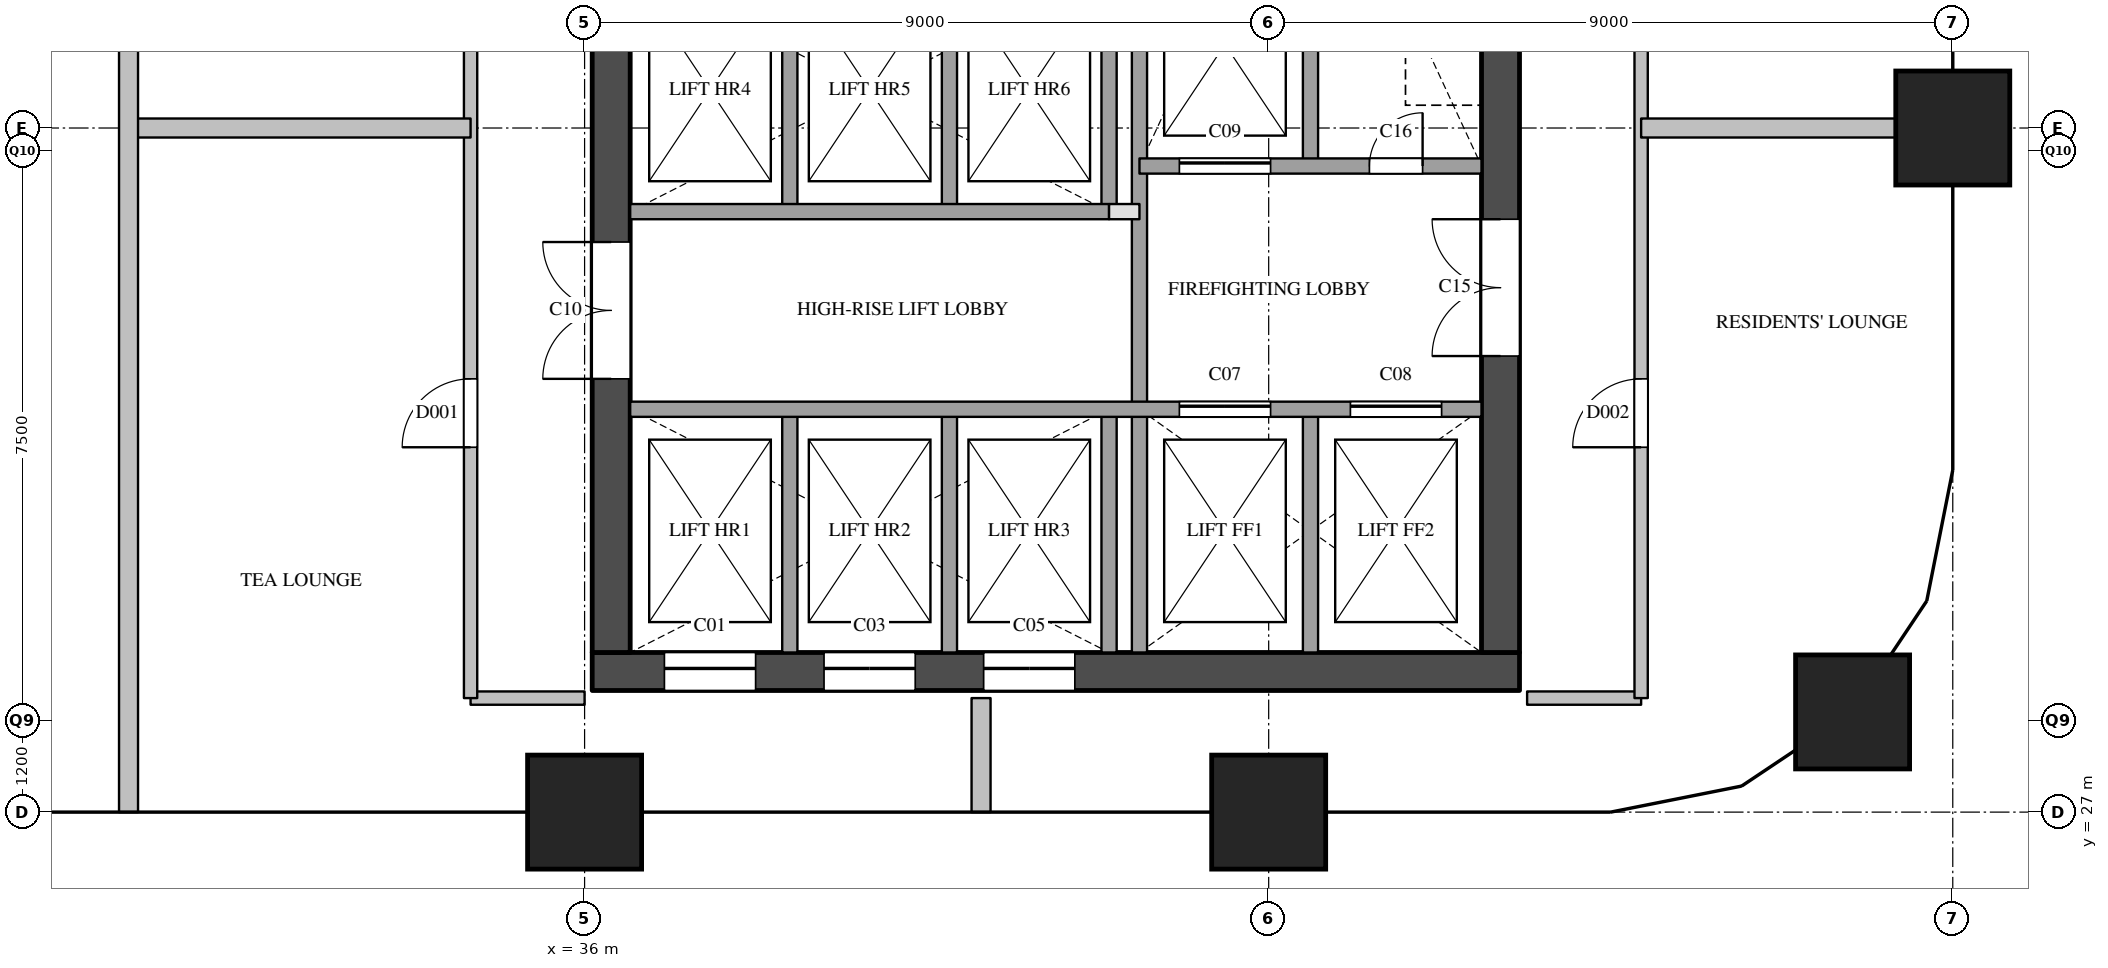
"""IFC4 building model, lengths in metres.
Left out: names, types, materials, properties, quantities, classifications, styles, units other than length and angle.
Written with IfcOpenShell. Run it as: python <this file> out.ifc"""

import sys

from ifc_helpers import new_model, si_unit, direction, frame, frame_2d, origin, origin_2d, place, context, subcontext, project, spatial, rectangle, extrude, element, fill, save


model = new_model("IFC4")
c1 = context("Model", 3, precision=1e-05, world=origin(), true_north=direction((0.0, 1.0)))
c2 = subcontext(c1, "Body", "Model", "MODEL_VIEW")
j1 = project(units=[si_unit("LENGTHUNIT", "METRE"), si_unit("PLANEANGLEUNIT", "RADIAN")], contexts=[c1])
p1 = place(None, origin())
s1 = spatial("IfcSite", under=j1, at=p1, CompositionType="ELEMENT")
p2 = place(p1, origin())
s2 = spatial("IfcBuilding", under=s1, at=p2, CompositionType="ELEMENT")
p3 = place(p2, frame((0.0, 0.0, 158.3)))
s3 = spatial("IfcBuildingStorey", under=s2, at=p3, CompositionType="ELEMENT", Elevation=158.3)
for number, where, z_axis, x_axis in (
    (1, (36.0, 27.0, 0.0), (0.0, 0.0, 1.0), (1.0, 0.0, 0.0)),
    (2, (45.0, 27.0, 0.0), (0.0, 0.0, 1.0), (1.0, 0.0, 0.0)),
    (3, (52.682, 28.318, 0.0), (0.0, 0.0, 1.0), (1.0, 0.0, 0.0)),
    (4, (54.0, 36.0, 0.0), (0.0, 0.0, 1.0), (1.0, 0.0, 0.0)),
):
    element("IfcColumn", number, at=place(p3, frame(where, z_axis=z_axis, x_axis=x_axis)), inside=s3, PredefinedType="COLUMN", context=c2, shape_type="SweptSolid", body=[
        extrude(rectangle(XDim=1.5, YDim=1.5, at=origin_2d()), origin(), (0.0, 0.0, 1.0), 3.9),
    ])
p4 = place(p3, frame((36.1, 28.85, 0.0), z_axis=(0.0, 0.0, 1.0), x_axis=(1.0, 0.0, 0.0)))
e5 = element("IfcWall", 5, at=p4, inside=s3, PredefinedType="SHEAR", context=c2, shape_type="SweptSolid", body=[
    extrude(rectangle(XDim=12.2, YDim=0.5, at=frame_2d((6.1, 0.0))), origin(), (0.0, 0.0, 1.0), 3.6),
])
p5 = place(p4, frame((0.95, 0.0, 0.0)))
e6 = element("IfcOpeningElement", 6, at=p5, cuts=e5, PredefinedType="OPENING", context=c2, shape_type="SweptSolid", body=[
    extrude(rectangle(XDim=1.2, YDim=2.1, at=frame_2d((0.6, 1.05))), frame((0.0, 0.26, 0.0), z_axis=(0.0, -1.0, 0.0), x_axis=(1.0, 0.0, 0.0)), (0.0, 0.0, 1.0), 0.52),
])
p6 = place(p4, frame((3.05, 0.0, 0.0)))
e7 = element("IfcOpeningElement", 7, at=p6, cuts=e5, PredefinedType="OPENING", context=c2, shape_type="SweptSolid", body=[
    extrude(rectangle(XDim=1.2, YDim=2.1, at=frame_2d((0.6, 1.05))), frame((0.0, 0.26, 0.0), z_axis=(0.0, -1.0, 0.0), x_axis=(1.0, 0.0, 0.0)), (0.0, 0.0, 1.0), 0.52),
])
p7 = place(p4, frame((5.15, 0.0, 0.0)))
e8 = element("IfcOpeningElement", 8, at=p7, cuts=e5, PredefinedType="OPENING", context=c2, shape_type="SweptSolid", body=[
    extrude(rectangle(XDim=1.2, YDim=2.1, at=frame_2d((0.6, 1.05))), frame((0.0, 0.26, 0.0), z_axis=(0.0, -1.0, 0.0), x_axis=(1.0, 0.0, 0.0)), (0.0, 0.0, 1.0), 0.52),
])
p8 = place(p3, frame((36.35, 29.1, 0.0), z_axis=(0.0, 0.0, 1.0), x_axis=(0.0, 1.0, 0.0)))
e9 = element("IfcWall", 9, at=p8, inside=s3, PredefinedType="SHEAR", context=c2, shape_type="SweptSolid", body=[
    extrude(rectangle(XDim=20.3, YDim=0.5, at=frame_2d((10.15, 0.0))), origin(), (0.0, 0.0, 1.0), 3.6),
])
p9 = place(p8, frame((3.6, 0.0, 0.0)))
e10 = element("IfcOpeningElement", 10, at=p9, cuts=e9, PredefinedType="OPENING", context=c2, shape_type="SweptSolid", body=[
    extrude(rectangle(XDim=1.8, YDim=2.1, at=frame_2d((0.9, 1.05))), frame((0.0, 0.26, 0.0), z_axis=(0.0, -1.0, 0.0), x_axis=(1.0, 0.0, 0.0)), (0.0, 0.0, 1.0), 0.52),
])
p10 = place(p8, frame((16.4, 0.0, 0.0)))
e11 = element("IfcOpeningElement", 11, at=p10, cuts=e9, PredefinedType="OPENING", context=c2, shape_type="SweptSolid", body=[
    extrude(rectangle(XDim=1.0, YDim=2.1, at=frame_2d((0.5, 1.05))), frame((0.0, 0.26, 0.0), z_axis=(0.0, -1.0, 0.0), x_axis=(1.0, 0.0, 0.0)), (0.0, 0.0, 1.0), 0.52),
])
p11 = place(p3, frame((48.05, 29.1, 0.0), z_axis=(0.0, 0.0, 1.0), x_axis=(0.0, 1.0, 0.0)))
e12 = element("IfcWall", 12, at=p11, inside=s3, PredefinedType="SHEAR", context=c2, shape_type="SweptSolid", body=[
    extrude(rectangle(XDim=20.3, YDim=0.5, at=frame_2d((10.15, 0.0))), origin(), (0.0, 0.0, 1.0), 3.6),
])
p12 = place(p11, frame((12.5, 0.0, 0.0)))
e13 = element("IfcOpeningElement", 13, at=p12, cuts=e12, PredefinedType="OPENING", context=c2, shape_type="SweptSolid", body=[
    extrude(rectangle(XDim=0.7, YDim=2.1, at=frame_2d((0.35, 1.05))), frame((0.0, 0.26, 0.0), z_axis=(0.0, -1.0, 0.0), x_axis=(1.0, 0.0, 0.0)), (0.0, 0.0, 1.0), 0.52),
])
p13 = place(p11, frame((3.9, 0.0, 0.0)))
e14 = element("IfcOpeningElement", 14, at=p13, cuts=e12, PredefinedType="OPENING", context=c2, shape_type="SweptSolid", body=[
    extrude(rectangle(XDim=1.8, YDim=2.1, at=frame_2d((0.9, 1.05))), frame((0.0, 0.26, 0.0), z_axis=(0.0, -1.0, 0.0), x_axis=(1.0, 0.0, 0.0)), (0.0, 0.0, 1.0), 0.52),
])
p14 = place(p3, frame((38.7, 29.1, 0.0), z_axis=(0.0, 0.0, 1.0), x_axis=(0.0, 1.0, 0.0)))
e15 = element("IfcWall", 15, at=p14, inside=s3, PredefinedType="SOLIDWALL", context=c2, shape_type="SweptSolid", body=[
    extrude(rectangle(XDim=3.2, YDim=0.2, at=frame_2d((1.6, 0.0))), origin(), (0.0, 0.0, 1.0), 3.6),
])
p15 = place(p3, frame((38.7, 34.9, 0.0), z_axis=(0.0, 0.0, 1.0), x_axis=(0.0, 1.0, 0.0)))
e16 = element("IfcWall", 16, at=p15, inside=s3, PredefinedType="SOLIDWALL", context=c2, shape_type="SweptSolid", body=[
    extrude(rectangle(XDim=3.2, YDim=0.2, at=frame_2d((1.6, 0.0))), origin(), (0.0, 0.0, 1.0), 3.6),
])
p16 = place(p3, frame((40.8, 29.1, 0.0), z_axis=(0.0, 0.0, 1.0), x_axis=(0.0, 1.0, 0.0)))
e17 = element("IfcWall", 17, at=p16, inside=s3, PredefinedType="SOLIDWALL", context=c2, shape_type="SweptSolid", body=[
    extrude(rectangle(XDim=3.2, YDim=0.2, at=frame_2d((1.6, 0.0))), origin(), (0.0, 0.0, 1.0), 3.6),
])
p17 = place(p3, frame((40.8, 34.9, 0.0), z_axis=(0.0, 0.0, 1.0), x_axis=(0.0, 1.0, 0.0)))
e18 = element("IfcWall", 18, at=p17, inside=s3, PredefinedType="SOLIDWALL", context=c2, shape_type="SweptSolid", body=[
    extrude(rectangle(XDim=3.2, YDim=0.2, at=frame_2d((1.6, 0.0))), origin(), (0.0, 0.0, 1.0), 3.6),
])
p18 = place(p3, frame((42.9, 29.1, 0.0), z_axis=(0.0, 0.0, 1.0), x_axis=(0.0, 1.0, 0.0)))
e19 = element("IfcWall", 19, at=p18, inside=s3, PredefinedType="SOLIDWALL", context=c2, shape_type="SweptSolid", body=[
    extrude(rectangle(XDim=3.2, YDim=0.2, at=frame_2d((1.6, 0.0))), origin(), (0.0, 0.0, 1.0), 3.6),
])
p19 = place(p3, frame((42.9, 34.9, 0.0), z_axis=(0.0, 0.0, 1.0), x_axis=(0.0, 1.0, 0.0)))
e20 = element("IfcWall", 20, at=p19, inside=s3, PredefinedType="SOLIDWALL", context=c2, shape_type="SweptSolid", body=[
    extrude(rectangle(XDim=3.2, YDim=0.2, at=frame_2d((1.6, 0.0))), origin(), (0.0, 0.0, 1.0), 3.6),
])
p20 = place(p3, frame((43.3, 29.1, 0.0), z_axis=(0.0, 0.0, 1.0), x_axis=(0.0, 1.0, 0.0)))
e21 = element("IfcWall", 21, at=p20, inside=s3, PredefinedType="SOLIDWALL", context=c2, shape_type="SweptSolid", body=[
    extrude(rectangle(XDim=9.9, YDim=0.2, at=frame_2d((4.95, 0.0))), origin(), (0.0, 0.0, 1.0), 3.6),
])
for number, where, z_axis, x_axis in (
    (22, (45.55, 29.1, 0.0), (0.0, 0.0, 1.0), (0.0, 1.0, 0.0)),
    (23, (45.55, 35.5, 0.0), (0.0, 0.0, 1.0), (0.0, 1.0, 0.0)),
):
    element("IfcWall", number, at=place(p3, frame(where, z_axis=z_axis, x_axis=x_axis)), inside=s3, PredefinedType="SOLIDWALL", context=c2, shape_type="SweptSolid", body=[
        extrude(rectangle(XDim=3.2, YDim=0.2, at=frame_2d((1.6, 0.0))), origin(), (0.0, 0.0, 1.0), 3.6),
    ])
p21 = place(p3, frame((36.6, 32.3, 0.0), z_axis=(0.0, 0.0, 1.0), x_axis=(1.0, 0.0, 0.0)))
e24 = element("IfcWall", 24, at=p21, inside=s3, PredefinedType="SOLIDWALL", context=c2, shape_type="SweptSolid", body=[
    extrude(rectangle(XDim=11.2, YDim=0.2, at=frame_2d((5.6, 0.0))), origin(), (0.0, 0.0, 1.0), 3.6),
])
p22 = place(p21, frame((7.225, 0.0, 0.0)))
e25 = element("IfcOpeningElement", 25, at=p22, cuts=e24, PredefinedType="OPENING", context=c2, shape_type="SweptSolid", body=[
    extrude(rectangle(XDim=1.2, YDim=2.1, at=frame_2d((0.6, 1.05))), frame((0.0, 0.11, 0.0), z_axis=(0.0, -1.0, 0.0), x_axis=(1.0, 0.0, 0.0)), (0.0, 0.0, 1.0), 0.22),
])
p23 = place(p21, frame((9.475, 0.0, 0.0)))
e26 = element("IfcOpeningElement", 26, at=p23, cuts=e24, PredefinedType="OPENING", context=c2, shape_type="SweptSolid", body=[
    extrude(rectangle(XDim=1.2, YDim=2.1, at=frame_2d((0.6, 1.05))), frame((0.0, 0.11, 0.0), z_axis=(0.0, -1.0, 0.0), x_axis=(1.0, 0.0, 0.0)), (0.0, 0.0, 1.0), 0.22),
])
p24 = place(p3, frame((42.9, 34.9, 0.0), z_axis=(0.0, 0.0, 1.0), x_axis=(1.0, 0.0, 0.0)))
e27 = element("IfcWall", 27, at=p24, inside=s3, PredefinedType="PARTITIONING", context=c2, shape_type="SweptSolid", body=[
    extrude(rectangle(XDim=0.4, YDim=0.2, at=frame_2d((0.2, 0.0))), origin(), (0.0, 0.0, 1.0), 3.6),
])
p25 = place(p3, frame((36.6, 34.9, 0.0), z_axis=(0.0, 0.0, 1.0), x_axis=(1.0, 0.0, 0.0)))
e28 = element("IfcWall", 28, at=p25, inside=s3, PredefinedType="SOLIDWALL", context=c2, shape_type="SweptSolid", body=[
    extrude(rectangle(XDim=6.3, YDim=0.2, at=frame_2d((3.15, 0.0))), origin(), (0.0, 0.0, 1.0), 3.6),
])
p26 = place(p3, frame((43.3, 35.5, 0.0), z_axis=(0.0, 0.0, 1.0), x_axis=(1.0, 0.0, 0.0)))
e29 = element("IfcWall", 29, at=p26, inside=s3, PredefinedType="SOLIDWALL", context=c2, shape_type="SweptSolid", body=[
    extrude(rectangle(XDim=4.5, YDim=0.2, at=frame_2d((2.25, 0.0))), origin(), (0.0, 0.0, 1.0), 3.6),
])
p27 = place(p26, frame((0.525, 0.0, 0.0)))
e30 = element("IfcOpeningElement", 30, at=p27, cuts=e29, PredefinedType="OPENING", context=c2, shape_type="SweptSolid", body=[
    extrude(rectangle(XDim=1.2, YDim=2.1, at=frame_2d((0.6, 1.05))), frame((0.0, 0.11, 0.0), z_axis=(0.0, -1.0, 0.0), x_axis=(1.0, 0.0, 0.0)), (0.0, 0.0, 1.0), 0.22),
])
p28 = place(p26, frame((3.025, 0.0, 0.0)))
e31 = element("IfcOpeningElement", 31, at=p28, cuts=e29, PredefinedType="OPENING", context=c2, shape_type="SweptSolid", body=[
    extrude(rectangle(XDim=0.7, YDim=2.1, at=frame_2d((0.35, 1.05))), frame((0.0, 0.11, 0.0), z_axis=(0.0, -1.0, 0.0), x_axis=(1.0, 0.0, 0.0)), (0.0, 0.0, 1.0), 0.22),
])
for number, where, z_axis, x_axis in (
    (32, (34.5, 28.5, 0.0), (0.0, 0.0, 1.0), (1.0, 0.0, 0.0)),
    (33, (48.4, 28.5, 0.0), (0.0, 0.0, 1.0), (1.0, 0.0, 0.0)),
):
    element("IfcWall", number, at=place(p3, frame(where, z_axis=z_axis, x_axis=x_axis)), inside=s3, PredefinedType="PARTITIONING", context=c2, shape_type="SweptSolid", body=[
        extrude(rectangle(XDim=1.5, YDim=0.175, at=frame_2d((0.75, 0.0))), origin(), (0.0, 0.0, 1.0), 3.6),
    ])
p29 = place(p3, frame((34.5, 28.5, 0.0), z_axis=(0.0, 0.0, 1.0), x_axis=(0.0, 1.0, 0.0)))
e34 = element("IfcWall", 34, at=p29, inside=s3, PredefinedType="PARTITIONING", context=c2, shape_type="SweptSolid", body=[
    extrude(rectangle(XDim=12.75, YDim=0.175, at=frame_2d((6.375, 0.0))), origin(), (0.0, 0.0, 1.0), 3.6),
])
p30 = place(p29, frame((3.3, 0.0, 0.0)))
e35 = element("IfcOpeningElement", 35, at=p30, cuts=e34, PredefinedType="OPENING", context=c2, shape_type="SweptSolid", body=[
    extrude(rectangle(XDim=0.9, YDim=2.1, at=frame_2d((0.45, 1.05))), frame((0.0, 0.097, 0.0), z_axis=(0.0, -1.0, 0.0), x_axis=(1.0, 0.0, 0.0)), (0.0, 0.0, 1.0), 0.195),
])
p31 = place(p29, frame((9.625, 0.0, 0.0)))
e36 = element("IfcOpeningElement", 36, at=p31, cuts=e34, PredefinedType="OPENING", context=c2, shape_type="SweptSolid", body=[
    extrude(rectangle(XDim=1.0, YDim=2.1, at=frame_2d((0.5, 1.05))), frame((0.0, 0.097, 0.0), z_axis=(0.0, -1.0, 0.0), x_axis=(1.0, 0.0, 0.0)), (0.0, 0.0, 1.0), 0.195),
])
p32 = place(p3, frame((49.9, 28.5, 0.0), z_axis=(0.0, 0.0, 1.0), x_axis=(0.0, 1.0, 0.0)))
e37 = element("IfcWall", 37, at=p32, inside=s3, PredefinedType="PARTITIONING", context=c2, shape_type="SweptSolid", body=[
    extrude(rectangle(XDim=23.0, YDim=0.175, at=frame_2d((11.5, 0.0))), origin(), (0.0, 0.0, 1.0), 3.6),
])
p33 = place(p32, frame((3.3, 0.0, 0.0)))
e38 = element("IfcOpeningElement", 38, at=p33, cuts=e37, PredefinedType="OPENING", context=c2, shape_type="SweptSolid", body=[
    extrude(rectangle(XDim=0.9, YDim=2.1, at=frame_2d((0.45, 1.05))), frame((0.0, 0.097, 0.0), z_axis=(0.0, -1.0, 0.0), x_axis=(1.0, 0.0, 0.0)), (0.0, 0.0, 1.0), 0.195),
])
p34 = place(p32, frame((14.8, 0.0, 0.0)))
e39 = element("IfcOpeningElement", 39, at=p34, cuts=e37, PredefinedType="OPENING", context=c2, shape_type="SweptSolid", body=[
    extrude(rectangle(XDim=0.9, YDim=2.1, at=frame_2d((0.45, 1.05))), frame((0.0, 0.097, 0.0), z_axis=(0.0, -1.0, 0.0), x_axis=(1.0, 0.0, 0.0)), (0.0, 0.0, 1.0), 0.195),
])
p35 = place(p3, frame((30.0, 36.0, 0.0), z_axis=(0.0, 0.0, 1.0), x_axis=(1.0, 0.0, 0.0)))
e40 = element("IfcWall", 40, at=p35, inside=s3, PredefinedType="PARTITIONING", context=c2, shape_type="SweptSolid", body=[
    extrude(rectangle(XDim=4.5, YDim=0.25, at=frame_2d((2.25, 0.0))), origin(), (0.0, 0.0, 1.0), 3.6),
])
p36 = place(p3, frame((49.9, 36.0, 0.0), z_axis=(0.0, 0.0, 1.0), x_axis=(1.0, 0.0, 0.0)))
e41 = element("IfcWall", 41, at=p36, inside=s3, PredefinedType="PARTITIONING", context=c2, shape_type="SweptSolid", body=[
    extrude(rectangle(XDim=4.1, YDim=0.25, at=frame_2d((2.05, 0.0))), origin(), (0.0, 0.0, 1.0), 3.6),
])
p37 = place(p3, frame((30.0, 27.0, 0.0), z_axis=(0.0, 0.0, 1.0), x_axis=(0.0, 1.0, 0.0)))
e42 = element("IfcWall", 42, at=p37, inside=s3, PredefinedType="PARTITIONING", context=c2, shape_type="SweptSolid", body=[
    extrude(rectangle(XDim=14.25, YDim=0.25, at=frame_2d((7.125, 0.0))), origin(), (0.0, 0.0, 1.0), 2.6),
])
p38 = place(p3, frame((41.216, 27.0, 0.0), z_axis=(0.0, 0.0, 1.0), x_axis=(0.0, 1.0, 0.0)))
e43 = element("IfcWall", 43, at=p38, inside=s3, PredefinedType="PARTITIONING", context=c2, shape_type="SweptSolid", body=[
    extrude(rectangle(XDim=1.5, YDim=0.25, at=frame_2d((0.75, 0.0))), origin(), (0.0, 0.0, 1.0), 2.6),
])
p39 = place(p5, origin())
e44 = element("IfcDoor", 44, at=p39, inside=s3, OperationType="SLIDING_TO_LEFT", PredefinedType="DOOR", context=c2, shape_type="SweptSolid", body=[
    extrude(rectangle(XDim=1.2, YDim=2.1, at=frame_2d((0.6, 1.05))), frame((0.0, 0.025, 0.0), z_axis=(0.0, -1.0, 0.0), x_axis=(1.0, 0.0, 0.0)), (0.0, 0.0, 1.0), 0.05),
])
fill(e6, e44)
p40 = place(p6, origin())
e45 = element("IfcDoor", 45, at=p40, inside=s3, OperationType="SLIDING_TO_LEFT", PredefinedType="DOOR", context=c2, shape_type="SweptSolid", body=[
    extrude(rectangle(XDim=1.2, YDim=2.1, at=frame_2d((0.6, 1.05))), frame((0.0, 0.025, 0.0), z_axis=(0.0, -1.0, 0.0), x_axis=(1.0, 0.0, 0.0)), (0.0, 0.0, 1.0), 0.05),
])
fill(e7, e45)
p41 = place(p7, origin())
e46 = element("IfcDoor", 46, at=p41, inside=s3, OperationType="SLIDING_TO_LEFT", PredefinedType="DOOR", context=c2, shape_type="SweptSolid", body=[
    extrude(rectangle(XDim=1.2, YDim=2.1, at=frame_2d((0.6, 1.05))), frame((0.0, 0.025, 0.0), z_axis=(0.0, -1.0, 0.0), x_axis=(1.0, 0.0, 0.0)), (0.0, 0.0, 1.0), 0.05),
])
fill(e8, e46)
p42 = place(p22, origin())
e47 = element("IfcDoor", 47, at=p42, inside=s3, OperationType="SLIDING_TO_LEFT", PredefinedType="DOOR", context=c2, shape_type="SweptSolid", body=[
    extrude(rectangle(XDim=1.2, YDim=2.1, at=frame_2d((0.6, 1.05))), frame((0.0, 0.025, 0.0), z_axis=(0.0, -1.0, 0.0), x_axis=(1.0, 0.0, 0.0)), (0.0, 0.0, 1.0), 0.05),
])
fill(e25, e47)
p43 = place(p23, origin())
e48 = element("IfcDoor", 48, at=p43, inside=s3, OperationType="SLIDING_TO_LEFT", PredefinedType="DOOR", context=c2, shape_type="SweptSolid", body=[
    extrude(rectangle(XDim=1.2, YDim=2.1, at=frame_2d((0.6, 1.05))), frame((0.0, 0.025, 0.0), z_axis=(0.0, -1.0, 0.0), x_axis=(1.0, 0.0, 0.0)), (0.0, 0.0, 1.0), 0.05),
])
fill(e26, e48)
p44 = place(p27, origin())
e49 = element("IfcDoor", 49, at=p44, inside=s3, OperationType="SLIDING_TO_LEFT", PredefinedType="DOOR", context=c2, shape_type="SweptSolid", body=[
    extrude(rectangle(XDim=1.2, YDim=2.1, at=frame_2d((0.6, 1.05))), frame((0.0, 0.025, 0.0), z_axis=(0.0, -1.0, 0.0), x_axis=(1.0, 0.0, 0.0)), (0.0, 0.0, 1.0), 0.05),
])
fill(e30, e49)
p45 = place(p9, origin())
e50 = element("IfcDoor", 50, at=p45, inside=s3, OperationType="DOUBLE_DOOR_SINGLE_SWING", PredefinedType="DOOR", context=c2, shape_type="SweptSolid", body=[
    extrude(rectangle(XDim=1.8, YDim=2.1, at=frame_2d((0.9, 1.05))), frame((0.0, 0.025, 0.0), z_axis=(0.0, -1.0, 0.0), x_axis=(1.0, 0.0, 0.0)), (0.0, 0.0, 1.0), 0.05),
])
fill(e10, e50)
p46 = place(p13, origin())
e51 = element("IfcDoor", 51, at=p46, inside=s3, OperationType="DOUBLE_DOOR_SINGLE_SWING", PredefinedType="DOOR", context=c2, shape_type="SweptSolid", body=[
    extrude(rectangle(XDim=1.8, YDim=2.1, at=frame_2d((0.9, 1.05))), frame((0.0, 0.025, 0.0), z_axis=(0.0, -1.0, 0.0), x_axis=(1.0, 0.0, 0.0)), (0.0, 0.0, 1.0), 0.05),
])
fill(e14, e51)
p47 = place(p28, origin())
e52 = element("IfcDoor", 52, at=p47, inside=s3, OperationType="SINGLE_SWING_RIGHT", PredefinedType="DOOR", context=c2, shape_type="SweptSolid", body=[
    extrude(rectangle(XDim=0.7, YDim=2.1, at=frame_2d((0.35, 1.05))), frame((0.0, 0.025, 0.0), z_axis=(0.0, -1.0, 0.0), x_axis=(1.0, 0.0, 0.0)), (0.0, 0.0, 1.0), 0.05),
])
fill(e31, e52)
p48 = place(p30, origin())
e53 = element("IfcDoor", 53, at=p48, inside=s3, OperationType="SINGLE_SWING_LEFT", PredefinedType="DOOR", context=c2, shape_type="SweptSolid", body=[
    extrude(rectangle(XDim=0.9, YDim=2.1, at=frame_2d((0.45, 1.05))), frame((0.0, 0.025, 0.0), z_axis=(0.0, -1.0, 0.0), x_axis=(1.0, 0.0, 0.0)), (0.0, 0.0, 1.0), 0.05),
])
fill(e35, e53)
p49 = place(p33, origin())
e54 = element("IfcDoor", 54, at=p49, inside=s3, OperationType="SINGLE_SWING_LEFT", PredefinedType="DOOR", context=c2, shape_type="SweptSolid", body=[
    extrude(rectangle(XDim=0.9, YDim=2.1, at=frame_2d((0.45, 1.05))), frame((0.0, 0.025, 0.0), z_axis=(0.0, -1.0, 0.0), x_axis=(1.0, 0.0, 0.0)), (0.0, 0.0, 1.0), 0.05),
])
fill(e38, e54)
save(model, sys.argv[1])
